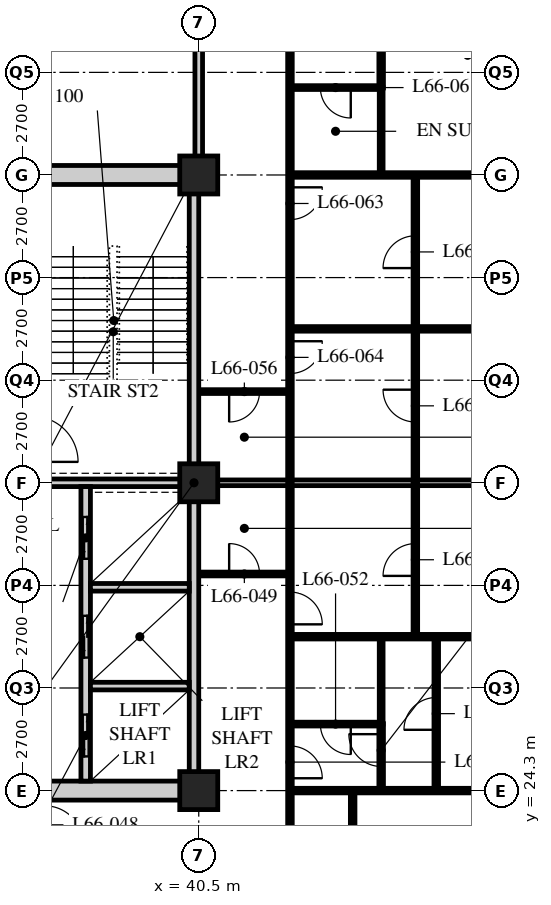
"""IFC4 building model, lengths in metres.
Left out: names, types, materials, properties, quantities, classifications, styles, units other than length and angle.
Written with IfcOpenShell. Run it as: python <this file> out.ifc"""

import sys

from ifc_helpers import new_model, si_unit, direction, frame, frame_2d, origin, origin_2d, place, context, subcontext, project, spatial, rectangle, hollow_rectangle, extrude, element, fill, save


model = new_model("IFC4")
c1 = context("Model", 3, precision=1e-05, world=origin(), true_north=direction((0.0, 1.0)))
c2 = subcontext(c1, "Body", "Model", "MODEL_VIEW")
j1 = project(units=[si_unit("LENGTHUNIT", "METRE"), si_unit("PLANEANGLEUNIT", "RADIAN")], contexts=[c1])
p1 = place(None, origin())
s1 = spatial("IfcSite", under=j1, at=p1, CompositionType="ELEMENT")
p2 = place(p1, origin())
s2 = spatial("IfcBuilding", under=s1, at=p2, CompositionType="ELEMENT")
p3 = place(p2, frame((0.0, 0.0, 258.0)))
s3 = spatial("IfcBuildingStorey", under=s2, at=p3, CompositionType="ELEMENT", Elevation=258.0)
for number, where, z_axis, x_axis in (
    (1, (40.5, 24.3, 0.0), (0.0, 0.0, 1.0), (1.0, 0.0, 0.0)),
    (2, (40.5, 32.4, 0.0), (0.0, 0.0, 1.0), (1.0, 0.0, 0.0)),
    (3, (40.5, 40.5, 0.0), (0.0, 0.0, 1.0), (1.0, 0.0, 0.0)),
):
    element("IfcColumn", number, at=place(p3, frame(where, z_axis=z_axis, x_axis=x_axis)), inside=s3, PredefinedType="COLUMN", context=c2, shape_type="SweptSolid", body=[
        extrude(hollow_rectangle(XDim=1.0, YDim=1.0, WallThickness=0.1, at=origin_2d()), origin(), (0.0, 0.0, 1.0), 3.9),
    ])
p4 = place(p3, frame((40.5, 40.5, 0.0), z_axis=(0.0, 0.0, 1.0), x_axis=(0.0, 1.0, 0.0)))
e4 = element("IfcWall", 4, at=p4, inside=s3, PredefinedType="SOLIDWALL", context=c2, shape_type="SweptSolid", body=[
    extrude(rectangle(XDim=6.3, YDim=0.2, at=frame_2d((3.15, 0.0))), origin(), (0.0, 0.0, 1.0), 3.078),
])
p5 = place(p3, frame((40.5, 30.0, 0.0), z_axis=(0.0, 0.0, 1.0), x_axis=(1.0, 0.0, 0.0)))
e5 = element("IfcWall", 5, at=p5, inside=s3, PredefinedType="PARTITIONING", context=c2, shape_type="SweptSolid", body=[
    extrude(rectangle(XDim=2.4, YDim=0.1, at=frame_2d((1.2, 0.0))), origin(), (0.0, 0.0, 1.0), 3.69),
])
p6 = place(p5, frame((0.8, 0.0, 0.0)))
e6 = element("IfcOpeningElement", 6, at=p6, cuts=e5, PredefinedType="OPENING", context=c2, shape_type="SweptSolid", body=[
    extrude(rectangle(XDim=0.8, YDim=2.1, at=frame_2d((0.4, 1.05))), frame((0.0, 0.06, 0.0), z_axis=(0.0, -1.0, 0.0), x_axis=(1.0, 0.0, 0.0)), (0.0, 0.0, 1.0), 0.12),
])
p7 = place(p3, frame((42.9, 22.5, 0.0), z_axis=(0.0, 0.0, 1.0), x_axis=(0.0, 1.0, 0.0)))
e7 = element("IfcWall", 7, at=p7, inside=s3, PredefinedType="PARTITIONING", context=c2, shape_type="SweptSolid", body=[
    extrude(rectangle(XDim=9.9, YDim=0.12, at=frame_2d((4.95, 0.0))), origin(), (0.0, 0.0, 1.0), 3.69),
])
p8 = place(p7, frame((2.125, 0.0, 0.0)))
e8 = element("IfcOpeningElement", 8, at=p8, cuts=e7, PredefinedType="OPENING", context=c2, shape_type="SweptSolid", body=[
    extrude(rectangle(XDim=0.85, YDim=2.1, at=frame_2d((0.425, 1.05))), frame((0.0, 0.07, 0.0), z_axis=(0.0, -1.0, 0.0), x_axis=(1.0, 0.0, 0.0)), (0.0, 0.0, 1.0), 0.14),
])
p9 = place(p7, frame((6.175, 0.0, 0.0)))
e9 = element("IfcOpeningElement", 9, at=p9, cuts=e7, PredefinedType="OPENING", context=c2, shape_type="SweptSolid", body=[
    extrude(rectangle(XDim=0.85, YDim=2.1, at=frame_2d((0.425, 1.05))), frame((0.0, 0.07, 0.0), z_axis=(0.0, -1.0, 0.0), x_axis=(1.0, 0.0, 0.0)), (0.0, 0.0, 1.0), 0.14),
])
p10 = place(p3, frame((42.9, 24.3, 0.0), z_axis=(0.0, 0.0, 1.0), x_axis=(1.0, 0.0, 0.0)))
e10 = element("IfcWall", 10, at=p10, inside=s3, PredefinedType="PARTITIONING", context=c2, shape_type="SweptSolid", body=[
    extrude(rectangle(XDim=9.45, YDim=0.12, at=frame_2d((4.725, 0.0))), origin(), (0.0, 0.0, 1.0), 3.078),
])
p11 = place(p3, frame((40.5, 32.4, 0.0), z_axis=(0.0, 0.0, 1.0), x_axis=(1.0, 0.0, 0.0)))
e11 = element("IfcWall", 11, at=p11, inside=s3, PredefinedType="PARTITIONING", context=c2, shape_type="SweptSolid", body=[
    extrude(rectangle(XDim=15.9, YDim=0.15, at=frame_2d((7.95, 0.0))), origin(), (0.0, 0.0, 1.0), 3.078),
])
p12 = place(p3, frame((44.55, 16.5, 0.0), z_axis=(0.0, 0.0, 1.0), x_axis=(0.0, 1.0, 0.0)))
e12 = element("IfcWall", 12, at=p12, inside=s3, PredefinedType="PARTITIONING", context=c2, shape_type="SweptSolid", body=[
    extrude(rectangle(XDim=7.8, YDim=0.12, at=frame_2d((3.9, 0.0))), origin(), (0.0, 0.0, 1.0), 3.69),
])
p13 = place(p12, frame((3.475, 0.0, 0.0)))
e13 = element("IfcOpeningElement", 13, at=p13, cuts=e12, PredefinedType="OPENING", context=c2, shape_type="SweptSolid", body=[
    extrude(rectangle(XDim=0.85, YDim=2.1, at=frame_2d((0.425, 1.05))), frame((0.0, 0.07, 0.0), z_axis=(0.0, -1.0, 0.0), x_axis=(1.0, 0.0, 0.0)), (0.0, 0.0, 1.0), 0.14),
])
p14 = place(p3, frame((42.9, 26.05, 0.0), z_axis=(0.0, 0.0, 1.0), x_axis=(1.0, 0.0, 0.0)))
e14 = element("IfcWall", 14, at=p14, inside=s3, PredefinedType="PARTITIONING", context=c2, shape_type="SweptSolid", body=[
    extrude(rectangle(XDim=2.4, YDim=0.1, at=frame_2d((1.2, 0.0))), origin(), (0.0, 0.0, 1.0), 3.69),
])
p15 = place(p14, frame((0.8, 0.0, 0.0)))
e15 = element("IfcOpeningElement", 15, at=p15, cuts=e14, PredefinedType="OPENING", context=c2, shape_type="SweptSolid", body=[
    extrude(rectangle(XDim=0.8, YDim=2.1, at=frame_2d((0.4, 1.05))), frame((0.0, 0.06, 0.0), z_axis=(0.0, -1.0, 0.0), x_axis=(1.0, 0.0, 0.0)), (0.0, 0.0, 1.0), 0.12),
])
p16 = place(p3, frame((45.3, 26.05, 0.0), z_axis=(0.0, 0.0, 1.0), x_axis=(0.0, 1.0, 0.0)))
e16 = element("IfcWall", 16, at=p16, inside=s3, PredefinedType="PARTITIONING", context=c2, shape_type="SweptSolid", body=[
    extrude(rectangle(XDim=2.3, YDim=0.1, at=frame_2d((1.15, 0.0))), origin(), (0.0, 0.0, 1.0), 3.69),
])
p17 = place(p3, frame((42.9, 28.35, 0.0), z_axis=(0.0, 0.0, 1.0), x_axis=(1.0, 0.0, 0.0)))
e17 = element("IfcWall", 17, at=p17, inside=s3, PredefinedType="PARTITIONING", context=c2, shape_type="SweptSolid", body=[
    extrude(rectangle(XDim=13.5, YDim=0.12, at=frame_2d((6.75, 0.0))), origin(), (0.0, 0.0, 1.0), 3.69),
])
p18 = place(p3, frame((40.5, 34.8, 0.0), z_axis=(0.0, 0.0, 1.0), x_axis=(1.0, 0.0, 0.0)))
e18 = element("IfcWall", 18, at=p18, inside=s3, PredefinedType="PARTITIONING", context=c2, shape_type="SweptSolid", body=[
    extrude(rectangle(XDim=2.4, YDim=0.1, at=frame_2d((1.2, 0.0))), origin(), (0.0, 0.0, 1.0), 3.69),
])
p19 = place(p18, frame((0.8, 0.0, 0.0)))
e19 = element("IfcOpeningElement", 19, at=p19, cuts=e18, PredefinedType="OPENING", context=c2, shape_type="SweptSolid", body=[
    extrude(rectangle(XDim=0.8, YDim=2.1, at=frame_2d((0.4, 1.05))), frame((0.0, 0.06, 0.0), z_axis=(0.0, -1.0, 0.0), x_axis=(1.0, 0.0, 0.0)), (0.0, 0.0, 1.0), 0.12),
])
p20 = place(p3, frame((42.9, 48.6, 0.0), z_axis=(0.0, 0.0, 1.0), x_axis=(0.0, -1.0, 0.0)))
e20 = element("IfcWall", 20, at=p20, inside=s3, PredefinedType="PARTITIONING", context=c2, shape_type="SweptSolid", body=[
    extrude(rectangle(XDim=16.2, YDim=0.12, at=frame_2d((8.1, 0.0))), origin(), (0.0, 0.0, 1.0), 3.69),
])
p21 = place(p20, frame((2.125, 0.0, 0.0)))
e21 = element("IfcOpeningElement", 21, at=p21, cuts=e20, PredefinedType="OPENING", context=c2, shape_type="SweptSolid", body=[
    extrude(rectangle(XDim=0.85, YDim=2.1, at=frame_2d((0.425, 1.05))), frame((0.0, 0.07, 0.0), z_axis=(0.0, -1.0, 0.0), x_axis=(1.0, 0.0, 0.0)), (0.0, 0.0, 1.0), 0.14),
])
p22 = place(p20, frame((8.425, 0.0, 0.0)))
e22 = element("IfcOpeningElement", 22, at=p22, cuts=e20, PredefinedType="OPENING", context=c2, shape_type="SweptSolid", body=[
    extrude(rectangle(XDim=0.85, YDim=2.1, at=frame_2d((0.425, 1.05))), frame((0.0, 0.07, 0.0), z_axis=(0.0, -1.0, 0.0), x_axis=(1.0, 0.0, 0.0)), (0.0, 0.0, 1.0), 0.14),
])
p23 = place(p20, frame((12.475, 0.0, 0.0)))
e23 = element("IfcOpeningElement", 23, at=p23, cuts=e20, PredefinedType="OPENING", context=c2, shape_type="SweptSolid", body=[
    extrude(rectangle(XDim=0.85, YDim=2.1, at=frame_2d((0.425, 1.05))), frame((0.0, 0.07, 0.0), z_axis=(0.0, -1.0, 0.0), x_axis=(1.0, 0.0, 0.0)), (0.0, 0.0, 1.0), 0.14),
])
p24 = place(p3, frame((42.9, 42.8, 0.0), z_axis=(0.0, 0.0, 1.0), x_axis=(1.0, 0.0, 0.0)))
e24 = element("IfcWall", 24, at=p24, inside=s3, PredefinedType="PARTITIONING", context=c2, shape_type="SweptSolid", body=[
    extrude(rectangle(XDim=2.4, YDim=0.1, at=frame_2d((1.2, 0.0))), origin(), (0.0, 0.0, 1.0), 3.69),
])
p25 = place(p24, frame((0.8, 0.0, 0.0)))
e25 = element("IfcOpeningElement", 25, at=p25, cuts=e24, PredefinedType="OPENING", context=c2, shape_type="SweptSolid", body=[
    extrude(rectangle(XDim=0.8, YDim=2.1, at=frame_2d((0.4, 1.05))), frame((0.0, 0.06, 0.0), z_axis=(0.0, -1.0, 0.0), x_axis=(1.0, 0.0, 0.0)), (0.0, 0.0, 1.0), 0.12),
])
p26 = place(p3, frame((45.3, 42.8, 0.0), z_axis=(0.0, 0.0, 1.0), x_axis=(0.0, -1.0, 0.0)))
e26 = element("IfcWall", 26, at=p26, inside=s3, PredefinedType="PARTITIONING", context=c2, shape_type="SweptSolid", body=[
    extrude(rectangle(XDim=2.3, YDim=0.1, at=frame_2d((1.15, 0.0))), origin(), (0.0, 0.0, 1.0), 3.69),
])
p27 = place(p3, frame((42.9, 40.5, 0.0), z_axis=(0.0, 0.0, 1.0), x_axis=(1.0, 0.0, 0.0)))
e27 = element("IfcWall", 27, at=p27, inside=s3, PredefinedType="PARTITIONING", context=c2, shape_type="SweptSolid", body=[
    extrude(rectangle(XDim=13.5, YDim=0.12, at=frame_2d((6.75, 0.0))), origin(), (0.0, 0.0, 1.0), 3.078),
])
p28 = place(p3, frame((42.9, 36.45, 0.0), z_axis=(0.0, 0.0, 1.0), x_axis=(1.0, 0.0, 0.0)))
e28 = element("IfcWall", 28, at=p28, inside=s3, PredefinedType="PARTITIONING", context=c2, shape_type="SweptSolid", body=[
    extrude(rectangle(XDim=13.5, YDim=0.12, at=frame_2d((6.75, 0.0))), origin(), (0.0, 0.0, 1.0), 3.69),
])
p29 = place(p3, frame((45.3, 24.3, 0.0), z_axis=(0.0, 0.0, 1.0), x_axis=(0.0, 1.0, 0.0)))
e29 = element("IfcWall", 29, at=p29, inside=s3, PredefinedType="PARTITIONING", context=c2, shape_type="SweptSolid", body=[
    extrude(rectangle(XDim=1.76, YDim=0.12, at=frame_2d((0.88, 0.0))), origin(), (0.0, 0.0, 1.0), 3.69),
])
p30 = place(p29, frame((0.635, 0.0, 0.0)))
e30 = element("IfcOpeningElement", 30, at=p30, cuts=e29, PredefinedType="OPENING", context=c2, shape_type="SweptSolid", body=[
    extrude(rectangle(XDim=0.85, YDim=2.1, at=frame_2d((0.425, 1.05))), frame((0.0, 0.07, 0.0), z_axis=(0.0, -1.0, 0.0), x_axis=(1.0, 0.0, 0.0)), (0.0, 0.0, 1.0), 0.14),
])
p31 = place(p3, frame((45.3, 46.8, 0.0), z_axis=(0.0, 0.0, 1.0), x_axis=(0.0, -1.0, 0.0)))
e31 = element("IfcWall", 31, at=p31, inside=s3, PredefinedType="PARTITIONING", context=c2, shape_type="SweptSolid", body=[
    extrude(rectangle(XDim=4.01, YDim=0.12, at=frame_2d((2.005, 0.0))), origin(), (0.0, 0.0, 1.0), 3.69),
])
p32 = place(p31, frame((0.275, 0.0, 0.0)))
e32 = element("IfcOpeningElement", 32, at=p32, cuts=e31, PredefinedType="OPENING", context=c2, shape_type="SweptSolid", body=[
    extrude(rectangle(XDim=0.85, YDim=2.1, at=frame_2d((0.425, 1.05))), frame((0.0, 0.07, 0.0), z_axis=(0.0, -1.0, 0.0), x_axis=(1.0, 0.0, 0.0)), (0.0, 0.0, 1.0), 0.14),
])
p33 = place(p3, frame((46.75, 24.3, 0.0), z_axis=(0.0, 0.0, 1.0), x_axis=(0.0, 1.0, 0.0)))
e33 = element("IfcWall", 33, at=p33, inside=s3, PredefinedType="PARTITIONING", context=c2, shape_type="SweptSolid", body=[
    extrude(rectangle(XDim=4.05, YDim=0.12, at=frame_2d((2.025, 0.0))), origin(), (0.0, 0.0, 1.0), 3.69),
])
p34 = place(p33, frame((1.6, 0.0, 0.0)))
e34 = element("IfcOpeningElement", 34, at=p34, cuts=e33, PredefinedType="OPENING", context=c2, shape_type="SweptSolid", body=[
    extrude(rectangle(XDim=0.85, YDim=2.1, at=frame_2d((0.425, 1.05))), frame((0.0, 0.07, 0.0), z_axis=(0.0, -1.0, 0.0), x_axis=(1.0, 0.0, 0.0)), (0.0, 0.0, 1.0), 0.14),
])
p35 = place(p3, frame((46.2, 28.35, 0.0), z_axis=(0.0, 0.0, 1.0), x_axis=(0.0, 1.0, 0.0)))
e35 = element("IfcWall", 35, at=p35, inside=s3, PredefinedType="PARTITIONING", context=c2, shape_type="SweptSolid", body=[
    extrude(rectangle(XDim=12.15, YDim=0.12, at=frame_2d((6.075, 0.0))), origin(), (0.0, 0.0, 1.0), 3.69),
])
p36 = place(p35, frame((1.6, 0.0, 0.0)))
e36 = element("IfcOpeningElement", 36, at=p36, cuts=e35, PredefinedType="OPENING", context=c2, shape_type="SweptSolid", body=[
    extrude(rectangle(XDim=0.85, YDim=2.1, at=frame_2d((0.425, 1.05))), frame((0.0, 0.07, 0.0), z_axis=(0.0, -1.0, 0.0), x_axis=(1.0, 0.0, 0.0)), (0.0, 0.0, 1.0), 0.14),
])
p37 = place(p35, frame((9.7, 0.0, 0.0)))
e37 = element("IfcOpeningElement", 37, at=p37, cuts=e35, PredefinedType="OPENING", context=c2, shape_type="SweptSolid", body=[
    extrude(rectangle(XDim=0.85, YDim=2.1, at=frame_2d((0.425, 1.05))), frame((0.0, 0.07, 0.0), z_axis=(0.0, -1.0, 0.0), x_axis=(1.0, 0.0, 0.0)), (0.0, 0.0, 1.0), 0.14),
])
p38 = place(p35, frame((5.65, 0.0, 0.0)))
e38 = element("IfcOpeningElement", 38, at=p38, cuts=e35, PredefinedType="OPENING", context=c2, shape_type="SweptSolid", body=[
    extrude(rectangle(XDim=0.85, YDim=2.1, at=frame_2d((0.425, 1.05))), frame((0.0, 0.07, 0.0), z_axis=(0.0, -1.0, 0.0), x_axis=(1.0, 0.0, 0.0)), (0.0, 0.0, 1.0), 0.14),
])
p39 = place(p3, frame((15.95, 24.3, 0.0), z_axis=(0.0, 0.0, 1.0), x_axis=(1.0, 0.0, 0.0)))
e39 = element("IfcWall", 39, at=p39, inside=s3, PredefinedType="SOLIDWALL", context=c2, shape_type="SweptSolid", body=[
    extrude(rectangle(XDim=24.55, YDim=0.5, at=frame_2d((12.275, 0.0))), origin(), (0.0, 0.0, 1.0), 3.04),
])
p40 = place(p39, frame((11.5, 0.0, 0.0)))
e40 = element("IfcOpeningElement", 40, at=p40, cuts=e39, PredefinedType="OPENING", context=c2, shape_type="SweptSolid", body=[
    extrude(rectangle(XDim=1.8, YDim=2.4, at=frame_2d((0.9, 1.2))), frame((0.0, 0.26, 0.0), z_axis=(0.0, -1.0, 0.0), x_axis=(1.0, 0.0, 0.0)), (0.0, 0.0, 1.0), 0.52),
])
p41 = place(p3, frame((15.95, 40.5, 0.0), z_axis=(0.0, 0.0, 1.0), x_axis=(1.0, 0.0, 0.0)))
e41 = element("IfcWall", 41, at=p41, inside=s3, PredefinedType="SOLIDWALL", context=c2, shape_type="SweptSolid", body=[
    extrude(rectangle(XDim=24.55, YDim=0.5, at=frame_2d((12.275, 0.0))), origin(), (0.0, 0.0, 1.0), 3.04),
])
p42 = place(p41, frame((11.5, 0.0, 0.0)))
e42 = element("IfcOpeningElement", 42, at=p42, cuts=e41, PredefinedType="OPENING", context=c2, shape_type="SweptSolid", body=[
    extrude(rectangle(XDim=1.8, YDim=2.4, at=frame_2d((0.9, 1.2))), frame((0.0, 0.26, 0.0), z_axis=(0.0, -1.0, 0.0), x_axis=(1.0, 0.0, 0.0)), (0.0, 0.0, 1.0), 0.52),
])
p43 = place(p3, frame((40.375, 24.55, 0.0), z_axis=(0.0, 0.0, 1.0), x_axis=(0.0, 1.0, 0.0)))
e43 = element("IfcWall", 43, at=p43, inside=s3, PredefinedType="SOLIDWALL", context=c2, shape_type="SweptSolid", body=[
    extrude(rectangle(XDim=15.7, YDim=0.25, at=frame_2d((7.85, 0.0))), origin(), (0.0, 0.0, 1.0), 3.078),
])
p44 = place(p3, frame((32.3, 32.4, 0.0), z_axis=(0.0, 0.0, 1.0), x_axis=(1.0, 0.0, 0.0)))
e44 = element("IfcWall", 44, at=p44, inside=s3, PredefinedType="SOLIDWALL", context=c2, shape_type="SweptSolid", body=[
    extrude(rectangle(XDim=7.95, YDim=0.2, at=frame_2d((3.975, 0.0))), origin(), (0.0, 0.0, 1.0), 3.078),
])
p45 = place(p3, frame((37.525, 24.55, 0.0), z_axis=(0.0, 0.0, 1.0), x_axis=(0.0, 1.0, 0.0)))
e45 = element("IfcWall", 45, at=p45, inside=s3, PredefinedType="SOLIDWALL", context=c2, shape_type="SweptSolid", body=[
    extrude(rectangle(XDim=7.75, YDim=0.25, at=frame_2d((3.875, 0.0))), origin(), (0.0, 0.0, 1.0), 3.69),
])
p46 = place(p45, frame((0.65, 0.0, 0.0)))
e46 = element("IfcOpeningElement", 46, at=p46, cuts=e45, PredefinedType="OPENING", context=c2, shape_type="SweptSolid", body=[
    extrude(rectangle(XDim=1.1, YDim=2.4, at=frame_2d((0.55, 1.2))), frame((0.0, 0.135, 0.0), z_axis=(0.0, -1.0, 0.0), x_axis=(1.0, 0.0, 0.0)), (0.0, 0.0, 1.0), 0.27),
])
p47 = place(p45, frame((3.25, 0.0, 0.0)))
e47 = element("IfcOpeningElement", 47, at=p47, cuts=e45, PredefinedType="OPENING", context=c2, shape_type="SweptSolid", body=[
    extrude(rectangle(XDim=1.1, YDim=2.4, at=frame_2d((0.55, 1.2))), frame((0.0, 0.135, 0.0), z_axis=(0.0, -1.0, 0.0), x_axis=(1.0, 0.0, 0.0)), (0.0, 0.0, 1.0), 0.27),
])
p48 = place(p45, frame((5.85, 0.0, 0.0)))
e48 = element("IfcOpeningElement", 48, at=p48, cuts=e45, PredefinedType="OPENING", context=c2, shape_type="SweptSolid", body=[
    extrude(rectangle(XDim=1.1, YDim=2.4, at=frame_2d((0.55, 1.2))), frame((0.0, 0.135, 0.0), z_axis=(0.0, -1.0, 0.0), x_axis=(1.0, 0.0, 0.0)), (0.0, 0.0, 1.0), 0.27),
])
for number, where, z_axis, x_axis in (
    (49, (37.65, 27.05, 0.0), (0.0, 0.0, 1.0), (1.0, 0.0, 0.0)),
    (50, (37.65, 29.65, 0.0), (0.0, 0.0, 1.0), (1.0, 0.0, 0.0)),
):
    element("IfcWall", number, at=place(p3, frame(where, z_axis=z_axis, x_axis=x_axis)), inside=s3, PredefinedType="SOLIDWALL", context=c2, shape_type="SweptSolid", body=[
        extrude(rectangle(XDim=2.6, YDim=0.2, at=frame_2d((1.3, 0.0))), origin(), (0.0, 0.0, 1.0), 3.69),
    ])
p49 = place(p6, origin())
e51 = element("IfcDoor", 51, at=p49, inside=s3, OperationType="SINGLE_SWING_LEFT", PredefinedType="DOOR", context=c2, shape_type="SweptSolid", body=[
    extrude(rectangle(XDim=0.8, YDim=2.1, at=frame_2d((0.4, 1.05))), frame((0.0, 0.025, 0.0), z_axis=(0.0, -1.0, 0.0), x_axis=(1.0, 0.0, 0.0)), (0.0, 0.0, 1.0), 0.05),
])
fill(e6, e51)
p50 = place(p15, origin())
e52 = element("IfcDoor", 52, at=p50, inside=s3, OperationType="SINGLE_SWING_LEFT", PredefinedType="DOOR", context=c2, shape_type="SweptSolid", body=[
    extrude(rectangle(XDim=0.8, YDim=2.1, at=frame_2d((0.4, 1.05))), frame((0.0, 0.025, 0.0), z_axis=(0.0, -1.0, 0.0), x_axis=(1.0, 0.0, 0.0)), (0.0, 0.0, 1.0), 0.05),
])
fill(e15, e52)
p51 = place(p8, origin())
e53 = element("IfcDoor", 53, at=p51, inside=s3, OperationType="SINGLE_SWING_RIGHT", PredefinedType="DOOR", context=c2, shape_type="SweptSolid", body=[
    extrude(rectangle(XDim=0.85, YDim=2.1, at=frame_2d((0.425, 1.05))), frame((0.0, 0.025, 0.0), z_axis=(0.0, -1.0, 0.0), x_axis=(1.0, 0.0, 0.0)), (0.0, 0.0, 1.0), 0.05),
])
fill(e8, e53)
p52 = place(p9, origin())
e54 = element("IfcDoor", 54, at=p52, inside=s3, OperationType="SINGLE_SWING_RIGHT", PredefinedType="DOOR", context=c2, shape_type="SweptSolid", body=[
    extrude(rectangle(XDim=0.85, YDim=2.1, at=frame_2d((0.425, 1.05))), frame((0.0, 0.025, 0.0), z_axis=(0.0, -1.0, 0.0), x_axis=(1.0, 0.0, 0.0)), (0.0, 0.0, 1.0), 0.05),
])
fill(e9, e54)
p53 = place(p19, origin())
e55 = element("IfcDoor", 55, at=p53, inside=s3, OperationType="SINGLE_SWING_RIGHT", PredefinedType="DOOR", context=c2, shape_type="SweptSolid", body=[
    extrude(rectangle(XDim=0.8, YDim=2.1, at=frame_2d((0.4, 1.05))), frame((0.0, 0.025, 0.0), z_axis=(0.0, -1.0, 0.0), x_axis=(1.0, 0.0, 0.0)), (0.0, 0.0, 1.0), 0.05),
])
fill(e19, e55)
p54 = place(p25, origin())
e56 = element("IfcDoor", 56, at=p54, inside=s3, OperationType="SINGLE_SWING_LEFT", PredefinedType="DOOR", context=c2, shape_type="SweptSolid", body=[
    extrude(rectangle(XDim=0.8, YDim=2.1, at=frame_2d((0.4, 1.05))), frame((0.0, 0.025, 0.0), z_axis=(0.0, -1.0, 0.0), x_axis=(1.0, 0.0, 0.0)), (0.0, 0.0, 1.0), 0.05),
])
fill(e25, e56)
p55 = place(p22, origin())
e57 = element("IfcDoor", 57, at=p55, inside=s3, OperationType="SINGLE_SWING_LEFT", PredefinedType="DOOR", context=c2, shape_type="SweptSolid", body=[
    extrude(rectangle(XDim=0.85, YDim=2.1, at=frame_2d((0.425, 1.05))), frame((0.0, 0.025, 0.0), z_axis=(0.0, -1.0, 0.0), x_axis=(1.0, 0.0, 0.0)), (0.0, 0.0, 1.0), 0.05),
])
fill(e22, e57)
p56 = place(p23, origin())
e58 = element("IfcDoor", 58, at=p56, inside=s3, OperationType="SINGLE_SWING_LEFT", PredefinedType="DOOR", context=c2, shape_type="SweptSolid", body=[
    extrude(rectangle(XDim=0.85, YDim=2.1, at=frame_2d((0.425, 1.05))), frame((0.0, 0.025, 0.0), z_axis=(0.0, -1.0, 0.0), x_axis=(1.0, 0.0, 0.0)), (0.0, 0.0, 1.0), 0.05),
])
fill(e23, e58)
p57 = place(p30, origin())
e59 = element("IfcDoor", 59, at=p57, inside=s3, OperationType="SINGLE_SWING_RIGHT", PredefinedType="DOOR", context=c2, shape_type="SweptSolid", body=[
    extrude(rectangle(XDim=0.85, YDim=2.1, at=frame_2d((0.425, 1.05))), frame((0.0, 0.025, 0.0), z_axis=(0.0, -1.0, 0.0), x_axis=(1.0, 0.0, 0.0)), (0.0, 0.0, 1.0), 0.05),
])
fill(e30, e59)
p58 = place(p34, origin())
e60 = element("IfcDoor", 60, at=p58, inside=s3, OperationType="SINGLE_SWING_LEFT", PredefinedType="DOOR", context=c2, shape_type="SweptSolid", body=[
    extrude(rectangle(XDim=0.85, YDim=2.1, at=frame_2d((0.425, 1.05))), frame((0.0, 0.025, 0.0), z_axis=(0.0, -1.0, 0.0), x_axis=(1.0, 0.0, 0.0)), (0.0, 0.0, 1.0), 0.05),
])
fill(e34, e60)
p59 = place(p36, origin())
e61 = element("IfcDoor", 61, at=p59, inside=s3, OperationType="SINGLE_SWING_LEFT", PredefinedType="DOOR", context=c2, shape_type="SweptSolid", body=[
    extrude(rectangle(XDim=0.85, YDim=2.1, at=frame_2d((0.425, 1.05))), frame((0.0, 0.025, 0.0), z_axis=(0.0, -1.0, 0.0), x_axis=(1.0, 0.0, 0.0)), (0.0, 0.0, 1.0), 0.05),
])
fill(e36, e61)
p60 = place(p37, origin())
e62 = element("IfcDoor", 62, at=p60, inside=s3, OperationType="SINGLE_SWING_LEFT", PredefinedType="DOOR", context=c2, shape_type="SweptSolid", body=[
    extrude(rectangle(XDim=0.85, YDim=2.1, at=frame_2d((0.425, 1.05))), frame((0.0, 0.025, 0.0), z_axis=(0.0, -1.0, 0.0), x_axis=(1.0, 0.0, 0.0)), (0.0, 0.0, 1.0), 0.05),
])
fill(e37, e62)
p61 = place(p38, origin())
e63 = element("IfcDoor", 63, at=p61, inside=s3, OperationType="SINGLE_SWING_RIGHT", PredefinedType="DOOR", context=c2, shape_type="SweptSolid", body=[
    extrude(rectangle(XDim=0.85, YDim=2.1, at=frame_2d((0.425, 1.05))), frame((0.0, 0.025, 0.0), z_axis=(0.0, -1.0, 0.0), x_axis=(1.0, 0.0, 0.0)), (0.0, 0.0, 1.0), 0.05),
])
fill(e38, e63)
p62 = place(p46, origin())
e64 = element("IfcDoor", 64, at=p62, inside=s3, OperationType="DOUBLE_DOOR_SLIDING", PredefinedType="DOOR", context=c2, shape_type="SweptSolid", body=[
    extrude(rectangle(XDim=1.1, YDim=2.4, at=frame_2d((0.55, 1.2))), frame((0.0, 0.025, 0.0), z_axis=(0.0, -1.0, 0.0), x_axis=(1.0, 0.0, 0.0)), (0.0, 0.0, 1.0), 0.05),
])
fill(e46, e64)
p63 = place(p47, origin())
e65 = element("IfcDoor", 65, at=p63, inside=s3, OperationType="DOUBLE_DOOR_SLIDING", PredefinedType="DOOR", context=c2, shape_type="SweptSolid", body=[
    extrude(rectangle(XDim=1.1, YDim=2.4, at=frame_2d((0.55, 1.2))), frame((0.0, 0.025, 0.0), z_axis=(0.0, -1.0, 0.0), x_axis=(1.0, 0.0, 0.0)), (0.0, 0.0, 1.0), 0.05),
])
fill(e47, e65)
p64 = place(p48, origin())
e66 = element("IfcDoor", 66, at=p64, inside=s3, OperationType="DOUBLE_DOOR_SLIDING", PredefinedType="DOOR", context=c2, shape_type="SweptSolid", body=[
    extrude(rectangle(XDim=1.1, YDim=2.4, at=frame_2d((0.55, 1.2))), frame((0.0, 0.025, 0.0), z_axis=(0.0, -1.0, 0.0), x_axis=(1.0, 0.0, 0.0)), (0.0, 0.0, 1.0), 0.05),
])
fill(e48, e66)
save(model, sys.argv[1])
